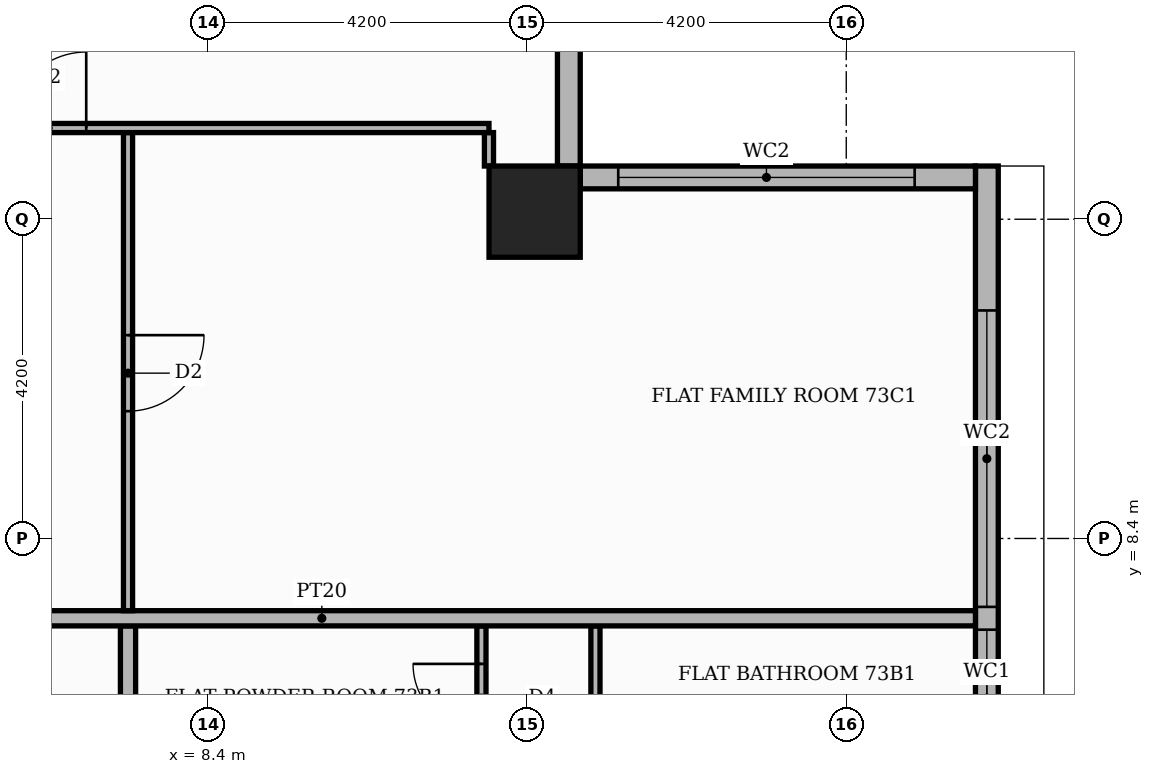
"""IFC4 building model, lengths in metres.
Left out: names, types, materials, properties, quantities, classifications, styles, units other than length and angle.
Written with IfcOpenShell. Run it as: python <this file> out.ifc"""

import sys

from ifc_helpers import new_model, si_unit, direction, frame, frame_2d, origin, origin_2d, place, context, subcontext, project, spatial, rectangle, extrude, element, fill, save


model = new_model("IFC4")
c1 = context("Model", 3, precision=1e-05, world=origin(), true_north=direction((0.0, 1.0)))
c2 = subcontext(c1, "Body", "Model", "MODEL_VIEW")
j1 = project(units=[si_unit("LENGTHUNIT", "METRE"), si_unit("PLANEANGLEUNIT", "RADIAN")], contexts=[c1])
p1 = place(None, origin())
s1 = spatial("IfcSite", under=j1, at=p1, CompositionType="ELEMENT")
p2 = place(p1, origin())
s2 = spatial("IfcBuilding", under=s1, at=p2, CompositionType="ELEMENT")
p3 = place(p2, frame((0.0, 0.0, 304.5)))
s3 = spatial("IfcBuildingStorey", under=s2, at=p3, CompositionType="ELEMENT", Elevation=304.5)
p4 = place(p3, frame((12.7, 12.7, 0.0), z_axis=(0.0, 0.0, 1.0), x_axis=(1.0, 0.0, 0.0)))
e1 = element("IfcColumn", 1, at=p4, inside=s3, PredefinedType="COLUMN", context=c2, shape_type="SweptSolid", body=[
    extrude(rectangle(XDim=1.2, YDim=1.2, at=origin_2d()), origin(), (0.0, 0.0, 1.0), 3.9),
])
p5 = place(p3, frame((18.65, -13.0, 0.0), z_axis=(0.0, 0.0, 1.0), x_axis=(0.0, 1.0, 0.0)))
e2 = element("IfcWall", 2, at=p5, inside=s3, PredefinedType="STANDARD", context=c2, shape_type="SweptSolid", body=[
    extrude(rectangle(XDim=26.3, YDim=0.3, at=frame_2d((13.15, 0.0))), origin(), (0.0, 0.0, 1.0), 3.55),
])
p6 = place(p5, frame((1.6, 0.0, 0.6)))
e3 = element("IfcOpeningElement", 3, at=p6, cuts=e2, PredefinedType="OPENING", context=c2, shape_type="SweptSolid", body=[
    extrude(rectangle(XDim=3.9, YDim=2.4, at=frame_2d((1.95, 1.2))), frame((0.0, 0.16, 0.0), z_axis=(0.0, -1.0, 0.0), x_axis=(1.0, 0.0, 0.0)), (0.0, 0.0, 1.0), 0.32),
])
p7 = place(p5, frame((5.8, 0.0, 0.6)))
e4 = element("IfcOpeningElement", 4, at=p7, cuts=e2, PredefinedType="OPENING", context=c2, shape_type="SweptSolid", body=[
    extrude(rectangle(XDim=3.9, YDim=2.4, at=frame_2d((1.95, 1.2))), frame((0.0, 0.16, 0.0), z_axis=(0.0, -1.0, 0.0), x_axis=(1.0, 0.0, 0.0)), (0.0, 0.0, 1.0), 0.32),
])
p8 = place(p5, frame((10.0, 0.0, 0.6)))
e5 = element("IfcOpeningElement", 5, at=p8, cuts=e2, PredefinedType="OPENING", context=c2, shape_type="SweptSolid", body=[
    extrude(rectangle(XDim=1.8, YDim=2.4, at=frame_2d((0.9, 1.2))), frame((0.0, 0.16, 0.0), z_axis=(0.0, -1.0, 0.0), x_axis=(1.0, 0.0, 0.0)), (0.0, 0.0, 1.0), 0.32),
])
p9 = place(p5, frame((12.1, 0.0, 0.6)))
e6 = element("IfcOpeningElement", 6, at=p9, cuts=e2, PredefinedType="OPENING", context=c2, shape_type="SweptSolid", body=[
    extrude(rectangle(XDim=1.8, YDim=2.4, at=frame_2d((0.9, 1.2))), frame((0.0, 0.16, 0.0), z_axis=(0.0, -1.0, 0.0), x_axis=(1.0, 0.0, 0.0)), (0.0, 0.0, 1.0), 0.32),
])
p10 = place(p5, frame((14.2, 0.0, 0.6)))
e7 = element("IfcOpeningElement", 7, at=p10, cuts=e2, PredefinedType="OPENING", context=c2, shape_type="SweptSolid", body=[
    extrude(rectangle(XDim=3.9, YDim=2.4, at=frame_2d((1.95, 1.2))), frame((0.0, 0.16, 0.0), z_axis=(0.0, -1.0, 0.0), x_axis=(1.0, 0.0, 0.0)), (0.0, 0.0, 1.0), 0.32),
])
p11 = place(p5, frame((18.4, 0.0, 0.6)))
e8 = element("IfcOpeningElement", 8, at=p11, cuts=e2, PredefinedType="OPENING", context=c2, shape_type="SweptSolid", body=[
    extrude(rectangle(XDim=1.8, YDim=2.4, at=frame_2d((0.9, 1.2))), frame((0.0, 0.16, 0.0), z_axis=(0.0, -1.0, 0.0), x_axis=(1.0, 0.0, 0.0)), (0.0, 0.0, 1.0), 0.32),
])
p12 = place(p5, frame((20.5, 0.0, 0.6)))
e9 = element("IfcOpeningElement", 9, at=p12, cuts=e2, PredefinedType="OPENING", context=c2, shape_type="SweptSolid", body=[
    extrude(rectangle(XDim=3.9, YDim=2.4, at=frame_2d((1.95, 1.2))), frame((0.0, 0.16, 0.0), z_axis=(0.0, -1.0, 0.0), x_axis=(1.0, 0.0, 0.0)), (0.0, 0.0, 1.0), 0.32),
])
p13 = place(p3, frame((18.5, 13.15, 0.0), z_axis=(0.0, 0.0, 1.0), x_axis=(-1.0, 0.0, 0.0)))
e10 = element("IfcWall", 10, at=p13, inside=s3, PredefinedType="STANDARD", context=c2, shape_type="SweptSolid", body=[
    extrude(rectangle(XDim=5.2, YDim=0.3, at=frame_2d((2.6, 0.0))), origin(), (0.0, 0.0, 1.0), 3.55),
])
p14 = place(p13, frame((0.8, 0.0, 0.6)))
e11 = element("IfcOpeningElement", 11, at=p14, cuts=e10, PredefinedType="OPENING", context=c2, shape_type="SweptSolid", body=[
    extrude(rectangle(XDim=3.9, YDim=2.4, at=frame_2d((1.95, 1.2))), frame((0.0, 0.16, 0.0), z_axis=(0.0, -1.0, 0.0), x_axis=(1.0, 0.0, 0.0)), (0.0, 0.0, 1.0), 0.32),
])
p15 = place(p3, frame((13.15, 13.3, 0.0), z_axis=(0.0, 0.0, 1.0), x_axis=(0.0, 1.0, 0.0)))
e12 = element("IfcWall", 12, at=p15, inside=s3, PredefinedType="STANDARD", context=c2, shape_type="SweptSolid", body=[
    extrude(rectangle(XDim=5.5, YDim=0.3, at=frame_2d((2.75, 0.0))), origin(), (0.0, 0.0, 1.0), 3.55),
])
p16 = place(p15, frame((2.6, 0.0, 0.6)))
e13 = element("IfcOpeningElement", 13, at=p16, cuts=e12, PredefinedType="OPENING", context=c2, shape_type="SweptSolid", body=[
    extrude(rectangle(XDim=1.8, YDim=2.4, at=frame_2d((0.9, 1.2))), frame((0.0, 0.16, 0.0), z_axis=(0.0, -1.0, 0.0), x_axis=(1.0, 0.0, 0.0)), (0.0, 0.0, 1.0), 0.32),
])
p17 = place(p3, frame((7.35, -7.25, 0.0), z_axis=(0.0, 0.0, 1.0), x_axis=(0.0, 1.0, 0.0)))
e14 = element("IfcWall", 14, at=p17, inside=s3, PredefinedType="PARTITIONING", context=c2, shape_type="SweptSolid", body=[
    extrude(rectangle(XDim=14.5, YDim=0.2, at=frame_2d((7.25, 0.0))), origin(), (0.0, 0.0, 1.0), 3.55),
])
p18 = place(p17, frame((1.45, 0.0, 0.0)))
e15 = element("IfcOpeningElement", 15, at=p18, cuts=e14, PredefinedType="OPENING", context=c2, shape_type="SweptSolid", body=[
    extrude(rectangle(XDim=1.1, YDim=2.4, at=frame_2d((0.55, 1.2))), frame((0.0, 0.11, 0.0), z_axis=(0.0, -1.0, 0.0), x_axis=(1.0, 0.0, 0.0)), (0.0, 0.0, 1.0), 0.22),
])
p19 = place(p3, frame((12.0, 5.31, 0.0), z_axis=(0.0, 0.0, 1.0), x_axis=(0.0, 1.0, 0.0)))
e16 = element("IfcWall", 16, at=p19, inside=s3, PredefinedType="PARTITIONING", context=c2, shape_type="SweptSolid", body=[
    extrude(rectangle(XDim=1.94, YDim=0.12, at=frame_2d((0.97, 0.0))), origin(), (0.0, 0.0, 1.0), 3.55),
])
p20 = place(p19, frame((0.54, 0.0, 0.0)))
e17 = element("IfcOpeningElement", 17, at=p20, cuts=e16, PredefinedType="OPENING", context=c2, shape_type="SweptSolid", body=[
    extrude(rectangle(XDim=0.9, YDim=2.1, at=frame_2d((0.45, 1.05))), frame((0.0, 0.07, 0.0), z_axis=(0.0, -1.0, 0.0), x_axis=(1.0, 0.0, 0.0)), (0.0, 0.0, 1.0), 0.14),
])
p21 = place(p3, frame((13.5, 5.31, 0.0), z_axis=(0.0, 0.0, 1.0), x_axis=(0.0, 1.0, 0.0)))
e18 = element("IfcWall", 18, at=p21, inside=s3, PredefinedType="PARTITIONING", context=c2, shape_type="SweptSolid", body=[
    extrude(rectangle(XDim=1.94, YDim=0.12, at=frame_2d((0.97, 0.0))), origin(), (0.0, 0.0, 1.0), 3.55),
])
p22 = place(p3, frame((1.3, 7.35, 0.0), z_axis=(0.0, 0.0, 1.0), x_axis=(1.0, 0.0, 0.0)))
e19 = element("IfcWall", 19, at=p22, inside=s3, PredefinedType="PARTITIONING", context=c2, shape_type="SweptSolid", body=[
    extrude(rectangle(XDim=17.2, YDim=0.2, at=frame_2d((8.6, 0.0))), origin(), (0.0, 0.0, 1.0), 3.55),
])
p23 = place(p22, frame((2.475, 0.0, 0.0)))
e20 = element("IfcOpeningElement", 20, at=p23, cuts=e19, PredefinedType="OPENING", context=c2, shape_type="SweptSolid", body=[
    extrude(rectangle(XDim=1.1, YDim=2.4, at=frame_2d((0.55, 1.2))), frame((0.0, 0.11, 0.0), z_axis=(0.0, -1.0, 0.0), x_axis=(1.0, 0.0, 0.0)), (0.0, 0.0, 1.0), 0.22),
])
p24 = place(p3, frame((7.35, 7.45, 0.0), z_axis=(0.0, 0.0, 1.0), x_axis=(0.0, 1.0, 0.0)))
e21 = element("IfcWall", 21, at=p24, inside=s3, PredefinedType="PARTITIONING", context=c2, shape_type="SweptSolid", body=[
    extrude(rectangle(XDim=6.29, YDim=0.12, at=frame_2d((3.145, 0.0))), origin(), (0.0, 0.0, 1.0), 3.55),
])
p25 = place(p24, frame((2.625, 0.0, 0.0)))
e22 = element("IfcOpeningElement", 22, at=p25, cuts=e21, PredefinedType="OPENING", context=c2, shape_type="SweptSolid", body=[
    extrude(rectangle(XDim=1.0, YDim=2.1, at=frame_2d((0.5, 1.05))), frame((0.0, 0.07, 0.0), z_axis=(0.0, -1.0, 0.0), x_axis=(1.0, 0.0, 0.0)), (0.0, 0.0, 1.0), 0.14),
])
p26 = place(p3, frame((12.099, 13.3, 0.0), z_axis=(0.0, 0.0, 1.0), x_axis=(0.0, 1.0, 0.0)))
e23 = element("IfcWall", 23, at=p26, inside=s3, PredefinedType="PARTITIONING", context=c2, shape_type="SweptSolid", body=[
    extrude(rectangle(XDim=0.44, YDim=0.12, at=frame_2d((0.22, 0.0))), origin(), (0.0, 0.0, 1.0), 3.55),
])
p27 = place(p3, frame((-7.25, 13.8, 0.0), z_axis=(0.0, 0.0, 1.0), x_axis=(1.0, 0.0, 0.0)))
e24 = element("IfcWall", 24, at=p27, inside=s3, PredefinedType="PARTITIONING", context=c2, shape_type="SweptSolid", body=[
    extrude(rectangle(XDim=19.349, YDim=0.12, at=frame_2d((9.675, 0.0))), origin(), (0.0, 0.0, 1.0), 3.55),
])
p28 = place(p27, frame((13.05, 0.0, 0.0)))
e25 = element("IfcOpeningElement", 25, at=p28, cuts=e24, PredefinedType="OPENING", context=c2, shape_type="SweptSolid", body=[
    extrude(rectangle(XDim=1.0, YDim=2.1, at=frame_2d((0.5, 1.05))), frame((0.0, 0.07, 0.0), z_axis=(0.0, -1.0, 0.0), x_axis=(1.0, 0.0, 0.0)), (0.0, 0.0, 1.0), 0.14),
])
p29 = place(p27, frame((7.85, 0.0, 0.0)))
e26 = element("IfcOpeningElement", 26, at=p29, cuts=e24, PredefinedType="OPENING", context=c2, shape_type="SweptSolid", body=[
    extrude(rectangle(XDim=0.9, YDim=2.1, at=frame_2d((0.45, 1.05))), frame((0.0, 0.07, 0.0), z_axis=(0.0, -1.0, 0.0), x_axis=(1.0, 0.0, 0.0)), (0.0, 0.0, 1.0), 0.14),
])
p30 = place(p11, origin())
e27 = element("IfcWindow", 27, at=p30, inside=s3, PartitioningType="SINGLE_PANEL", PredefinedType="WINDOW", context=c2, shape_type="SweptSolid", body=[
    extrude(rectangle(XDim=1.8, YDim=2.4, at=frame_2d((0.9, 1.2))), frame((0.0, 0.03, 0.0), z_axis=(0.0, -1.0, 0.0), x_axis=(1.0, 0.0, 0.0)), (0.0, 0.0, 1.0), 0.06),
])
fill(e8, e27)
p31 = place(p12, origin())
e28 = element("IfcWindow", 28, at=p31, inside=s3, PartitioningType="SINGLE_PANEL", PredefinedType="WINDOW", context=c2, shape_type="SweptSolid", body=[
    extrude(rectangle(XDim=3.9, YDim=2.4, at=frame_2d((1.95, 1.2))), frame((0.0, 0.03, 0.0), z_axis=(0.0, -1.0, 0.0), x_axis=(1.0, 0.0, 0.0)), (0.0, 0.0, 1.0), 0.06),
])
fill(e9, e28)
p32 = place(p14, origin())
e29 = element("IfcWindow", 29, at=p32, inside=s3, PartitioningType="SINGLE_PANEL", PredefinedType="WINDOW", context=c2, shape_type="SweptSolid", body=[
    extrude(rectangle(XDim=3.9, YDim=2.4, at=frame_2d((1.95, 1.2))), frame((0.0, 0.03, 0.0), z_axis=(0.0, -1.0, 0.0), x_axis=(1.0, 0.0, 0.0)), (0.0, 0.0, 1.0), 0.06),
])
fill(e11, e29)
p33 = place(p20, origin())
e30 = element("IfcDoor", 30, at=p33, inside=s3, OperationType="SINGLE_SWING_RIGHT", PredefinedType="DOOR", context=c2, shape_type="SweptSolid", body=[
    extrude(rectangle(XDim=0.9, YDim=2.1, at=frame_2d((0.45, 1.05))), frame((0.0, 0.025, 0.0), z_axis=(0.0, -1.0, 0.0), x_axis=(1.0, 0.0, 0.0)), (0.0, 0.0, 1.0), 0.05),
])
fill(e17, e30)
p34 = place(p25, frame((1.0, 0.0, 0.0), z_axis=(0.0, 0.0, 1.0), x_axis=(-1.0, 0.0, 0.0)))
e31 = element("IfcDoor", 31, at=p34, inside=s3, OperationType="SINGLE_SWING_RIGHT", PredefinedType="DOOR", context=c2, shape_type="SweptSolid", body=[
    extrude(rectangle(XDim=1.0, YDim=2.1, at=frame_2d((0.5, 1.05))), frame((0.0, 0.025, 0.0), z_axis=(0.0, -1.0, 0.0), x_axis=(1.0, 0.0, 0.0)), (0.0, 0.0, 1.0), 0.05),
])
fill(e22, e31)
p35 = place(p28, origin())
e32 = element("IfcDoor", 32, at=p35, inside=s3, OperationType="SINGLE_SWING_RIGHT", PredefinedType="DOOR", context=c2, shape_type="SweptSolid", body=[
    extrude(rectangle(XDim=1.0, YDim=2.1, at=frame_2d((0.5, 1.05))), frame((0.0, 0.025, 0.0), z_axis=(0.0, -1.0, 0.0), x_axis=(1.0, 0.0, 0.0)), (0.0, 0.0, 1.0), 0.05),
])
fill(e25, e32)
save(model, sys.argv[1])
